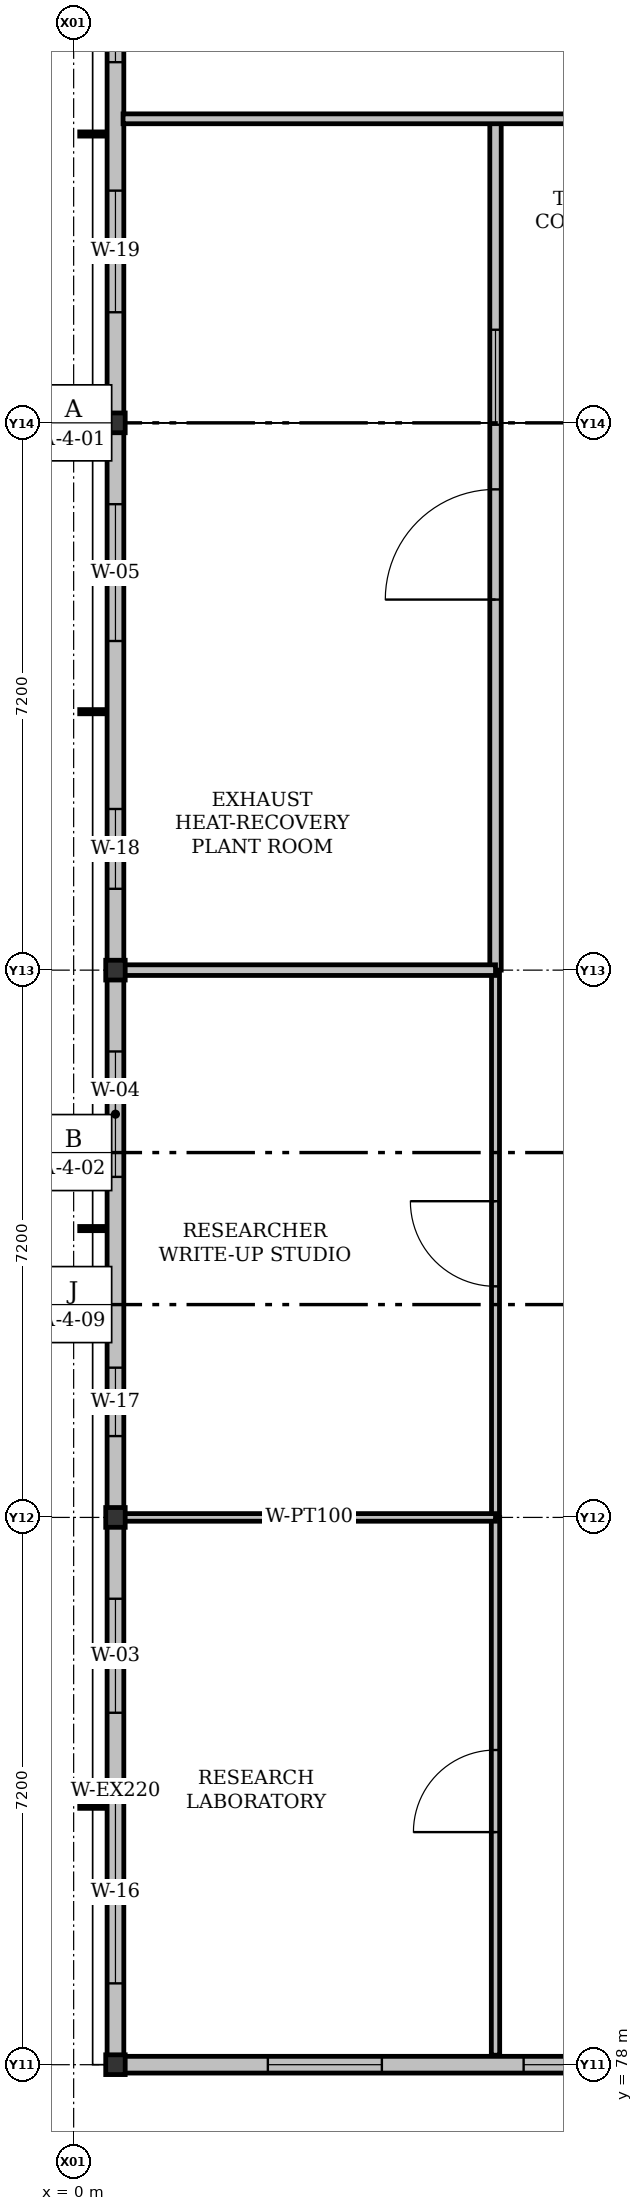
"""IFC4 building model, lengths in metres.
Left out: names, types, materials, properties, quantities, classifications, styles, units other than length and angle.
Written with IfcOpenShell. Run it as: python <this file> out.ifc"""

import sys

from ifc_helpers import new_model, si_unit, direction, frame, frame_2d, origin, origin_2d, place, context, subcontext, project, spatial, rectangle, i_section, extrude, element, fill, save


model = new_model("IFC4")
c1 = context("Model", 3, precision=1e-05, world=origin(), true_north=direction((0.0, 1.0)))
c2 = subcontext(c1, "Body", "Model", "MODEL_VIEW")
j1 = project(units=[si_unit("LENGTHUNIT", "METRE"), si_unit("PLANEANGLEUNIT", "RADIAN")], contexts=[c1])
p1 = place(None, origin())
s1 = spatial("IfcSite", under=j1, at=p1, CompositionType="ELEMENT")
p2 = place(p1, origin())
s2 = spatial("IfcBuilding", under=s1, at=p2, CompositionType="ELEMENT")
p3 = place(p2, frame((0.0, 0.0, 64.5)))
s3 = spatial("IfcBuildingStorey", under=s2, at=p3, CompositionType="ELEMENT", Elevation=64.5)
for number, where, z_axis, x_axis in (
    (1, (0.55, 78.0, 0.0), (0.0, 0.0, 1.0), (1.0, 0.0, 0.0)),
    (2, (0.55, 85.2, 0.0), (0.0, 0.0, 1.0), (1.0, 0.0, 0.0)),
    (3, (0.55, 92.4, 0.0), (0.0, 0.0, 1.0), (1.0, 0.0, 0.0)),
    (4, (0.55, 99.6, 0.0), (0.0, 0.0, 1.0), (1.0, 0.0, 0.0)),
):
    element("IfcColumn", number, at=place(p3, frame(where, z_axis=z_axis, x_axis=x_axis)), inside=s3, PredefinedType="COLUMN", context=c2, shape_type="SweptSolid", body=[
        extrude(i_section(OverallWidth=0.256, OverallDepth=0.26, WebThickness=0.011, FlangeThickness=0.017, FilletRadius=0.013, at=origin_2d()), origin(), (0.0, 0.0, 1.0), 4.2),
    ])
p4 = place(p3, frame((0.55, 78.0, 0.0), z_axis=(0.0, 0.0, 1.0), x_axis=(0.0, 1.0, 0.0)))
e5 = element("IfcWall", 5, at=p4, inside=s3, PredefinedType="SOLIDWALL", context=c2, shape_type="SweptSolid", body=[
    extrude(rectangle(XDim=7.2, YDim=0.22, at=frame_2d((3.6, 0.0))), origin(), (0.0, 0.0, 1.0), 3.562),
])
p5 = place(p4, frame((1.07, 0.0, 0.92)))
e6 = element("IfcOpeningElement", 6, at=p5, cuts=e5, PredefinedType="OPENING", context=c2, shape_type="SweptSolid", body=[
    extrude(rectangle(XDim=2.4, YDim=1.7, at=frame_2d((1.2, 0.85))), frame((0.0, 0.11, 0.0), z_axis=(0.0, -1.0, 0.0), x_axis=(1.0, 0.0, 0.0)), (0.0, 0.0, 1.0), 0.22),
])
p6 = place(p4, frame((4.63, 0.0, 0.92)))
e7 = element("IfcOpeningElement", 7, at=p6, cuts=e5, PredefinedType="OPENING", context=c2, shape_type="SweptSolid", body=[
    extrude(rectangle(XDim=1.5, YDim=1.4, at=frame_2d((0.75, 0.7))), frame((0.0, 0.11, 0.0), z_axis=(0.0, -1.0, 0.0), x_axis=(1.0, 0.0, 0.0)), (0.0, 0.0, 1.0), 0.22),
])
p7 = place(p3, frame((0.55, 85.2, 0.0), z_axis=(0.0, 0.0, 1.0), x_axis=(0.0, 1.0, 0.0)))
e8 = element("IfcWall", 8, at=p7, inside=s3, PredefinedType="SOLIDWALL", context=c2, shape_type="SweptSolid", body=[
    extrude(rectangle(XDim=7.2, YDim=0.22, at=frame_2d((3.6, 0.0))), origin(), (0.0, 0.0, 1.0), 3.562),
])
p8 = place(p7, frame((1.07, 0.0, 0.92)))
e9 = element("IfcOpeningElement", 9, at=p8, cuts=e8, PredefinedType="OPENING", context=c2, shape_type="SweptSolid", body=[
    extrude(rectangle(XDim=0.9, YDim=1.3, at=frame_2d((0.45, 0.65))), frame((0.0, 0.11, 0.0), z_axis=(0.0, -1.0, 0.0), x_axis=(1.0, 0.0, 0.0)), (0.0, 0.0, 1.0), 0.22),
])
p9 = place(p7, frame((4.48, 0.0, 0.92)))
e10 = element("IfcOpeningElement", 10, at=p9, cuts=e8, PredefinedType="OPENING", context=c2, shape_type="SweptSolid", body=[
    extrude(rectangle(XDim=1.65, YDim=1.4, at=frame_2d((0.825, 0.7))), frame((0.0, 0.11, 0.0), z_axis=(0.0, -1.0, 0.0), x_axis=(1.0, 0.0, 0.0)), (0.0, 0.0, 1.0), 0.22),
])
p10 = place(p3, frame((0.55, 92.4, 0.0), z_axis=(0.0, 0.0, 1.0), x_axis=(0.0, 1.0, 0.0)))
e11 = element("IfcWall", 11, at=p10, inside=s3, PredefinedType="SOLIDWALL", context=c2, shape_type="SweptSolid", body=[
    extrude(rectangle(XDim=7.2, YDim=0.22, at=frame_2d((3.6, 0.0))), origin(), (0.0, 0.0, 1.0), 3.562),
])
p11 = place(p10, frame((1.07, 0.0, 0.92)))
e12 = element("IfcOpeningElement", 12, at=p11, cuts=e11, PredefinedType="OPENING", context=c2, shape_type="SweptSolid", body=[
    extrude(rectangle(XDim=1.05, YDim=1.3, at=frame_2d((0.525, 0.65))), frame((0.0, 0.11, 0.0), z_axis=(0.0, -1.0, 0.0), x_axis=(1.0, 0.0, 0.0)), (0.0, 0.0, 1.0), 0.22),
])
p12 = place(p10, frame((4.33, 0.0, 0.92)))
e13 = element("IfcOpeningElement", 13, at=p12, cuts=e11, PredefinedType="OPENING", context=c2, shape_type="SweptSolid", body=[
    extrude(rectangle(XDim=1.8, YDim=1.4, at=frame_2d((0.9, 0.7))), frame((0.0, 0.11, 0.0), z_axis=(0.0, -1.0, 0.0), x_axis=(1.0, 0.0, 0.0)), (0.0, 0.0, 1.0), 0.22),
])
p13 = place(p3, frame((0.55, 99.6, 0.0), z_axis=(0.0, 0.0, 1.0), x_axis=(0.0, 1.0, 0.0)))
e14 = element("IfcWall", 14, at=p13, inside=s3, PredefinedType="SOLIDWALL", context=c2, shape_type="SweptSolid", body=[
    extrude(rectangle(XDim=7.2, YDim=0.22, at=frame_2d((3.6, 0.0))), origin(), (0.0, 0.0, 1.0), 3.562),
])
p14 = place(p13, frame((1.455, 0.0, 0.92)))
e15 = element("IfcOpeningElement", 15, at=p14, cuts=e14, PredefinedType="OPENING", context=c2, shape_type="SweptSolid", body=[
    extrude(rectangle(XDim=1.6, YDim=1.35, at=frame_2d((0.8, 0.675))), frame((0.0, 0.11, 0.0), z_axis=(0.0, -1.0, 0.0), x_axis=(1.0, 0.0, 0.0)), (0.0, 0.0, 1.0), 0.22),
])
p15 = place(p13, frame((4.745, 0.0, 0.92)))
e16 = element("IfcOpeningElement", 16, at=p15, cuts=e14, PredefinedType="OPENING", context=c2, shape_type="SweptSolid", body=[
    extrude(rectangle(XDim=1.2, YDim=1.7, at=frame_2d((0.6, 0.85))), frame((0.0, 0.11, 0.0), z_axis=(0.0, -1.0, 0.0), x_axis=(1.0, 0.0, 0.0)), (0.0, 0.0, 1.0), 0.22),
])
p16 = place(p3, frame((7.85, 78.0, 0.0), z_axis=(0.0, 0.0, 1.0), x_axis=(-1.0, 0.0, 0.0)))
e17 = element("IfcWall", 17, at=p16, inside=s3, PredefinedType="SOLIDWALL", context=c2, shape_type="SweptSolid", body=[
    extrude(rectangle(XDim=7.3, YDim=0.22, at=frame_2d((3.65, 0.0))), origin(), (0.0, 0.0, 1.0), 3.562),
])
p17 = place(p16, frame((0.88, 0.0, 0.92)))
e18 = element("IfcOpeningElement", 18, at=p17, cuts=e17, PredefinedType="OPENING", context=c2, shape_type="SweptSolid", body=[
    extrude(rectangle(XDim=1.05, YDim=1.3, at=frame_2d((0.525, 0.65))), frame((0.0, 0.11, 0.0), z_axis=(0.0, -1.0, 0.0), x_axis=(1.0, 0.0, 0.0)), (0.0, 0.0, 1.0), 0.22),
])
p18 = place(p16, frame((3.795, 0.0, 0.92)))
e19 = element("IfcOpeningElement", 19, at=p18, cuts=e17, PredefinedType="OPENING", context=c2, shape_type="SweptSolid", body=[
    extrude(rectangle(XDim=1.5, YDim=1.4, at=frame_2d((0.75, 0.7))), frame((0.0, 0.11, 0.0), z_axis=(0.0, -1.0, 0.0), x_axis=(1.0, 0.0, 0.0)), (0.0, 0.0, 1.0), 0.22),
])
p19 = place(p3, frame((5.55, 78.125, 0.0), z_axis=(0.0, 0.0, 1.0), x_axis=(0.0, 1.0, 0.0)))
e20 = element("IfcWall", 20, at=p19, inside=s3, PredefinedType="PARTITIONING", context=c2, shape_type="SweptSolid", body=[
    extrude(rectangle(XDim=7.075, YDim=0.11, at=frame_2d((3.538, 0.0))), origin(), (0.0, 0.0, 1.0), 3.436),
])
p20 = place(p19, frame((2.935, 0.0, 0.0)))
e21 = element("IfcOpeningElement", 21, at=p20, cuts=e20, PredefinedType="OPENING", context=c2, shape_type="SweptSolid", body=[
    extrude(rectangle(XDim=1.08, YDim=2.15, at=frame_2d((0.54, 1.075))), frame((0.0, 0.055, 0.0), z_axis=(0.0, -1.0, 0.0), x_axis=(1.0, 0.0, 0.0)), (0.0, 0.0, 1.0), 0.11),
])
p21 = place(p3, frame((5.55, 85.2, 0.0), z_axis=(0.0, 0.0, 1.0), x_axis=(0.0, 1.0, 0.0)))
e22 = element("IfcWall", 22, at=p21, inside=s3, PredefinedType="PARTITIONING", context=c2, shape_type="SweptSolid", body=[
    extrude(rectangle(XDim=7.2, YDim=0.105, at=frame_2d((3.6, 0.0))), origin(), (0.0, 0.0, 1.0), 3.436),
])
p22 = place(p21, frame((3.04, 0.0, 0.0)))
e23 = element("IfcOpeningElement", 23, at=p22, cuts=e22, PredefinedType="OPENING", context=c2, shape_type="SweptSolid", body=[
    extrude(rectangle(XDim=1.12, YDim=2.15, at=frame_2d((0.56, 1.075))), frame((0.0, 0.052, 0.0), z_axis=(0.0, -1.0, 0.0), x_axis=(1.0, 0.0, 0.0)), (0.0, 0.0, 1.0), 0.105),
])
p23 = place(p3, frame((0.65, 85.2, 0.0), z_axis=(0.0, 0.0, 1.0), x_axis=(1.0, 0.0, 0.0)))
e24 = element("IfcWall", 24, at=p23, inside=s3, PredefinedType="PARTITIONING", context=c2, shape_type="SweptSolid", body=[
    extrude(rectangle(XDim=4.9, YDim=0.1, at=frame_2d((2.45, 0.0))), origin(), (0.0, 0.0, 1.0), 3.436),
])
p24 = place(p3, frame((5.55, 92.4, 0.0), z_axis=(0.0, 0.0, 1.0), x_axis=(0.0, 1.0, 0.0)))
e25 = element("IfcWall", 25, at=p24, inside=s3, PredefinedType="PARTITIONING", context=c2, shape_type="SweptSolid", body=[
    extrude(rectangle(XDim=11.2, YDim=0.15, at=frame_2d((5.6, 0.0))), origin(), (0.0, 0.0, 1.0), 3.436),
])
p25 = place(p24, frame((4.875, 0.0, 0.0)))
e26 = element("IfcOpeningElement", 26, at=p25, cuts=e25, PredefinedType="OPENING", context=c2, shape_type="SweptSolid", body=[
    extrude(rectangle(XDim=1.45, YDim=2.2, at=frame_2d((0.725, 1.1))), frame((0.0, 0.075, 0.0), z_axis=(0.0, -1.0, 0.0), x_axis=(1.0, 0.0, 0.0)), (0.0, 0.0, 1.0), 0.15),
])
p26 = place(p24, frame((7.175, 0.0, 0.92)))
e27 = element("IfcOpeningElement", 27, at=p26, cuts=e25, PredefinedType="OPENING", context=c2, shape_type="SweptSolid", body=[
    extrude(rectangle(XDim=1.25, YDim=1.1, at=frame_2d((0.625, 0.55))), frame((0.0, 0.075, 0.0), z_axis=(0.0, -1.0, 0.0), x_axis=(1.0, 0.0, 0.0)), (0.0, 0.0, 1.0), 0.15),
])
p27 = place(p3, frame((0.65, 92.4, 0.0), z_axis=(0.0, 0.0, 1.0), x_axis=(1.0, 0.0, 0.0)))
e28 = element("IfcWall", 28, at=p27, inside=s3, PredefinedType="PARTITIONING", context=c2, shape_type="SweptSolid", body=[
    extrude(rectangle(XDim=4.9, YDim=0.14, at=frame_2d((2.45, 0.0))), origin(), (0.0, 0.0, 1.0), 3.436),
])
p28 = place(p3, frame((0.65, 103.6, 0.0), z_axis=(0.0, 0.0, 1.0), x_axis=(1.0, 0.0, 0.0)))
e29 = element("IfcWall", 29, at=p28, inside=s3, PredefinedType="PARTITIONING", context=c2, shape_type="SweptSolid", body=[
    extrude(rectangle(XDim=19.1, YDim=0.13, at=frame_2d((9.55, 0.0))), origin(), (0.0, 0.0, 1.0), 3.512),
])
p29 = place(p28, frame((9.45, 0.0, 0.0)))
e30 = element("IfcOpeningElement", 30, at=p29, cuts=e29, PredefinedType="OPENING", context=c2, shape_type="SweptSolid", body=[
    extrude(rectangle(XDim=1.0, YDim=2.2, at=frame_2d((0.5, 1.1))), frame((0.0, 0.065, 0.0), z_axis=(0.0, -1.0, 0.0), x_axis=(1.0, 0.0, 0.0)), (0.0, 0.0, 1.0), 0.13),
])
p30 = place(p28, frame((11.3, 0.0, 0.92)))
e31 = element("IfcOpeningElement", 31, at=p30, cuts=e29, PredefinedType="OPENING", context=c2, shape_type="SweptSolid", body=[
    extrude(rectangle(XDim=0.9, YDim=1.2, at=frame_2d((0.45, 0.6))), frame((0.0, 0.065, 0.0), z_axis=(0.0, -1.0, 0.0), x_axis=(1.0, 0.0, 0.0)), (0.0, 0.0, 1.0), 0.13),
])
p31 = place(p5, origin())
e32 = element("IfcWindow", 32, at=p31, inside=s3, PartitioningType="DOUBLE_PANEL_VERTICAL", PredefinedType="WINDOW", context=c2, shape_type="SweptSolid", body=[
    extrude(rectangle(XDim=2.4, YDim=1.7, at=frame_2d((1.2, 0.85))), frame((0.0, 0.03, 0.0), z_axis=(0.0, -1.0, 0.0), x_axis=(1.0, 0.0, 0.0)), (0.0, 0.0, 1.0), 0.06),
])
fill(e6, e32)
p32 = place(p6, origin())
e33 = element("IfcWindow", 33, at=p32, inside=s3, PartitioningType="SINGLE_PANEL", PredefinedType="WINDOW", context=c2, shape_type="SweptSolid", body=[
    extrude(rectangle(XDim=1.5, YDim=1.4, at=frame_2d((0.75, 0.7))), frame((0.0, 0.03, 0.0), z_axis=(0.0, -1.0, 0.0), x_axis=(1.0, 0.0, 0.0)), (0.0, 0.0, 1.0), 0.06),
])
fill(e7, e33)
p33 = place(p8, origin())
e34 = element("IfcWindow", 34, at=p33, inside=s3, PartitioningType="SINGLE_PANEL", PredefinedType="WINDOW", context=c2, shape_type="SweptSolid", body=[
    extrude(rectangle(XDim=0.9, YDim=1.3, at=frame_2d((0.45, 0.65))), frame((0.0, 0.03, 0.0), z_axis=(0.0, -1.0, 0.0), x_axis=(1.0, 0.0, 0.0)), (0.0, 0.0, 1.0), 0.06),
])
fill(e9, e34)
p34 = place(p9, origin())
e35 = element("IfcWindow", 35, at=p34, inside=s3, PartitioningType="DOUBLE_PANEL_VERTICAL", PredefinedType="WINDOW", context=c2, shape_type="SweptSolid", body=[
    extrude(rectangle(XDim=1.65, YDim=1.4, at=frame_2d((0.825, 0.7))), frame((0.0, 0.03, 0.0), z_axis=(0.0, -1.0, 0.0), x_axis=(1.0, 0.0, 0.0)), (0.0, 0.0, 1.0), 0.06),
])
fill(e10, e35)
p35 = place(p11, origin())
e36 = element("IfcWindow", 36, at=p35, inside=s3, PartitioningType="SINGLE_PANEL", PredefinedType="WINDOW", context=c2, shape_type="SweptSolid", body=[
    extrude(rectangle(XDim=1.05, YDim=1.3, at=frame_2d((0.525, 0.65))), frame((0.0, 0.03, 0.0), z_axis=(0.0, -1.0, 0.0), x_axis=(1.0, 0.0, 0.0)), (0.0, 0.0, 1.0), 0.06),
])
fill(e12, e36)
p36 = place(p12, origin())
e37 = element("IfcWindow", 37, at=p36, inside=s3, PartitioningType="DOUBLE_PANEL_VERTICAL", PredefinedType="WINDOW", context=c2, shape_type="SweptSolid", body=[
    extrude(rectangle(XDim=1.8, YDim=1.4, at=frame_2d((0.9, 0.7))), frame((0.0, 0.03, 0.0), z_axis=(0.0, -1.0, 0.0), x_axis=(1.0, 0.0, 0.0)), (0.0, 0.0, 1.0), 0.06),
])
fill(e13, e37)
p37 = place(p14, origin())
e38 = element("IfcWindow", 38, at=p37, inside=s3, PartitioningType="DOUBLE_PANEL_VERTICAL", PredefinedType="WINDOW", context=c2, shape_type="SweptSolid", body=[
    extrude(rectangle(XDim=1.6, YDim=1.35, at=frame_2d((0.8, 0.675))), frame((0.0, 0.03, 0.0), z_axis=(0.0, -1.0, 0.0), x_axis=(1.0, 0.0, 0.0)), (0.0, 0.0, 1.0), 0.06),
])
fill(e15, e38)
p38 = place(p15, origin())
e39 = element("IfcWindow", 39, at=p38, inside=s3, PartitioningType="SINGLE_PANEL", PredefinedType="WINDOW", context=c2, shape_type="SweptSolid", body=[
    extrude(rectangle(XDim=1.2, YDim=1.7, at=frame_2d((0.6, 0.85))), frame((0.0, 0.03, 0.0), z_axis=(0.0, -1.0, 0.0), x_axis=(1.0, 0.0, 0.0)), (0.0, 0.0, 1.0), 0.06),
])
fill(e16, e39)
p39 = place(p17, origin())
e40 = element("IfcWindow", 40, at=p39, inside=s3, PartitioningType="SINGLE_PANEL", PredefinedType="WINDOW", context=c2, shape_type="SweptSolid", body=[
    extrude(rectangle(XDim=1.05, YDim=1.3, at=frame_2d((0.525, 0.65))), frame((0.0, 0.03, 0.0), z_axis=(0.0, -1.0, 0.0), x_axis=(1.0, 0.0, 0.0)), (0.0, 0.0, 1.0), 0.06),
])
fill(e18, e40)
p40 = place(p18, origin())
e41 = element("IfcWindow", 41, at=p40, inside=s3, PartitioningType="SINGLE_PANEL", PredefinedType="WINDOW", context=c2, shape_type="SweptSolid", body=[
    extrude(rectangle(XDim=1.5, YDim=1.4, at=frame_2d((0.75, 0.7))), frame((0.0, 0.03, 0.0), z_axis=(0.0, -1.0, 0.0), x_axis=(1.0, 0.0, 0.0)), (0.0, 0.0, 1.0), 0.06),
])
fill(e19, e41)
p41 = place(p20, origin())
e42 = element("IfcDoor", 42, at=p41, inside=s3, OperationType="SINGLE_SWING_LEFT", PredefinedType="DOOR", context=c2, shape_type="SweptSolid", body=[
    extrude(rectangle(XDim=1.08, YDim=2.15, at=frame_2d((0.54, 1.075))), frame((0.0, 0.025, 0.0), z_axis=(0.0, -1.0, 0.0), x_axis=(1.0, 0.0, 0.0)), (0.0, 0.0, 1.0), 0.05),
])
fill(e21, e42)
p42 = place(p22, origin())
e43 = element("IfcDoor", 43, at=p42, inside=s3, OperationType="SINGLE_SWING_RIGHT", PredefinedType="DOOR", context=c2, shape_type="SweptSolid", body=[
    extrude(rectangle(XDim=1.12, YDim=2.15, at=frame_2d((0.56, 1.075))), frame((0.0, 0.025, 0.0), z_axis=(0.0, -1.0, 0.0), x_axis=(1.0, 0.0, 0.0)), (0.0, 0.0, 1.0), 0.05),
])
fill(e23, e43)
p43 = place(p25, origin())
e44 = element("IfcDoor", 44, at=p43, inside=s3, OperationType="SINGLE_SWING_LEFT", PredefinedType="DOOR", context=c2, shape_type="SweptSolid", body=[
    extrude(rectangle(XDim=1.45, YDim=2.2, at=frame_2d((0.725, 1.1))), frame((0.0, 0.025, 0.0), z_axis=(0.0, -1.0, 0.0), x_axis=(1.0, 0.0, 0.0)), (0.0, 0.0, 1.0), 0.05),
])
fill(e26, e44)
p44 = place(p26, origin())
e45 = element("IfcWindow", 45, at=p44, inside=s3, PartitioningType="SINGLE_PANEL", PredefinedType="WINDOW", context=c2, shape_type="SweptSolid", body=[
    extrude(rectangle(XDim=1.25, YDim=1.1, at=frame_2d((0.625, 0.55))), frame((0.0, 0.03, 0.0), z_axis=(0.0, -1.0, 0.0), x_axis=(1.0, 0.0, 0.0)), (0.0, 0.0, 1.0), 0.06),
])
fill(e27, e45)
save(model, sys.argv[1])
